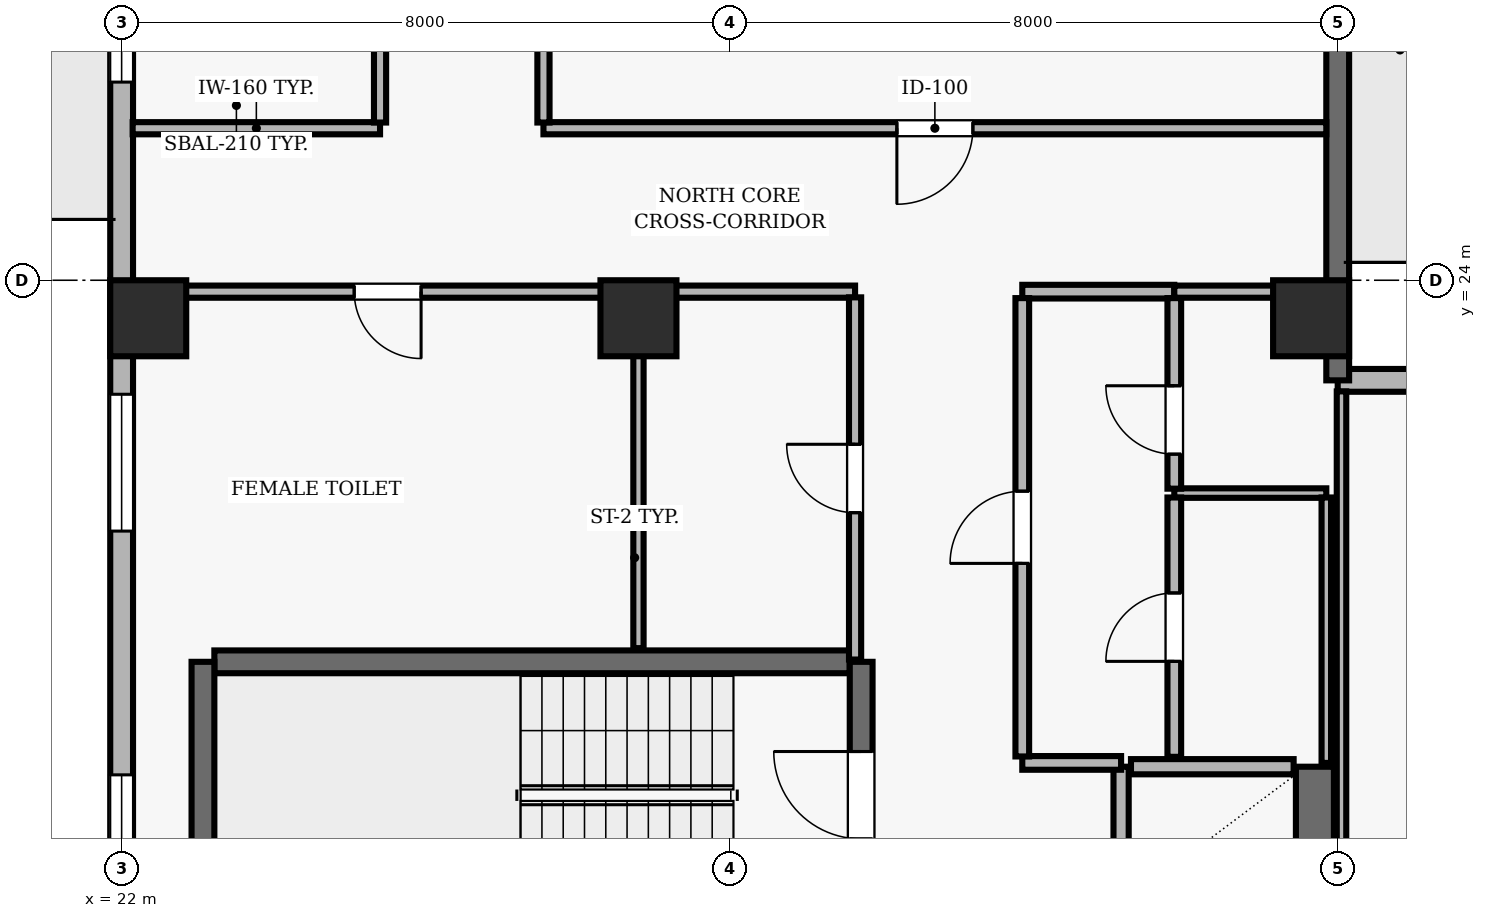
"""IFC4 building model, lengths in metres.
Left out: names, types, materials, properties, quantities, classifications, styles, units other than length and angle.
Written with IfcOpenShell. Run it as: python <this file> out.ifc"""

import sys

from ifc_helpers import new_model, si_unit, direction, frame, frame_2d, origin, origin_2d, place, context, subcontext, project, spatial, rectangle, extrude, element, fill, save


model = new_model("IFC4")
c1 = context("Model", 3, precision=1e-05, world=origin(), true_north=direction((0.0, 1.0)))
c2 = subcontext(c1, "Body", "Model", "MODEL_VIEW")
j1 = project(units=[si_unit("LENGTHUNIT", "METRE"), si_unit("PLANEANGLEUNIT", "RADIAN")], contexts=[c1])
p1 = place(None, origin())
s1 = spatial("IfcSite", under=j1, at=p1, CompositionType="ELEMENT")
p2 = place(p1, origin())
s2 = spatial("IfcBuilding", under=s1, at=p2, CompositionType="ELEMENT")
p3 = place(p2, frame((0.0, 0.0, 207.0)))
s3 = spatial("IfcBuildingStorey", under=s2, at=p3, CompositionType="ELEMENT", Elevation=207.0)
for number, where, z_axis, x_axis in (
    (1, (22.35, 23.5, 0.0), (0.0, 0.0, 1.0), (1.0, 0.0, 0.0)),
    (2, (28.8, 23.5, 0.0), (0.0, 0.0, 1.0), (1.0, 0.0, 0.0)),
    (3, (37.65, 23.5, 0.0), (0.0, 0.0, 1.0), (1.0, 0.0, 0.0)),
):
    element("IfcColumn", number, at=place(p3, frame(where, z_axis=z_axis, x_axis=x_axis)), inside=s3, PredefinedType="COLUMN", context=c2, shape_type="SweptSolid", body=[
        extrude(rectangle(XDim=1.0, YDim=1.0, at=origin_2d()), origin(), (0.0, 0.0, 1.0), 3.9),
    ])
p4 = place(p3, frame((44.45, 22.683, 0.0), z_axis=(0.0, 0.0, 1.0), x_axis=(-1.0, 0.0, 0.0)))
e4 = element("IfcWall", 4, at=p4, inside=s3, PredefinedType="SOLIDWALL", context=c2, shape_type="SweptSolid", body=[
    extrude(rectangle(XDim=6.45, YDim=0.3, at=frame_2d((3.225, 0.0))), origin(), (0.0, 0.0, 1.0), 3.69),
])
p5 = place(p4, frame((2.325, 0.0, 0.9)))
e5 = element("IfcOpeningElement", 5, at=p5, cuts=e4, PredefinedType="OPENING", context=c2, shape_type="SweptSolid", body=[
    extrude(rectangle(XDim=1.8, YDim=2.2, at=frame_2d((0.9, 1.1))), frame((0.0, 0.16, 0.0), z_axis=(0.0, -1.0, 0.0), x_axis=(1.0, 0.0, 0.0)), (0.0, 0.0, 1.0), 0.32),
])
p6 = place(p3, frame((38.0, 22.683, 0.0), z_axis=(0.0, 0.0, 1.0), x_axis=(0.0, 1.0, 0.0)))
e6 = element("IfcWall", 6, at=p6, inside=s3, PredefinedType="SOLIDWALL", context=c2, shape_type="SweptSolid", body=[
    extrude(rectangle(XDim=18.017, YDim=0.3, at=frame_2d((9.008, 0.0))), origin(), (0.0, 0.0, 1.0), 3.69),
])
p7 = place(p6, frame((8.934, 0.0, 0.0)))
e7 = element("IfcOpeningElement", 7, at=p7, cuts=e6, PredefinedType="OPENING", context=c2, shape_type="SweptSolid", body=[
    extrude(rectangle(XDim=1.0, YDim=2.2, at=frame_2d((0.5, 1.1))), frame((0.0, 0.16, 0.0), z_axis=(0.0, -1.0, 0.0), x_axis=(1.0, 0.0, 0.0)), (0.0, 0.0, 1.0), 0.32),
])
p8 = place(p6, frame((13.814, 0.0, 0.9)))
e8 = element("IfcOpeningElement", 8, at=p8, cuts=e6, PredefinedType="OPENING", context=c2, shape_type="SweptSolid", body=[
    extrude(rectangle(XDim=2.4, YDim=2.2, at=frame_2d((1.2, 1.1))), frame((0.0, 0.16, 0.0), z_axis=(0.0, -1.0, 0.0), x_axis=(1.0, 0.0, 0.0)), (0.0, 0.0, 1.0), 0.32),
])
p9 = place(p3, frame((22.0, 40.7, 0.0), z_axis=(0.0, 0.0, 1.0), x_axis=(0.0, -1.0, 0.0)))
e9 = element("IfcWall", 9, at=p9, inside=s3, PredefinedType="SOLIDWALL", context=c2, shape_type="SweptSolid", body=[
    extrude(rectangle(XDim=38.2, YDim=0.3, at=frame_2d((19.1, 0.0))), origin(), (0.0, 0.0, 1.0), 3.69),
])
p10 = place(p9, frame((7.8, 0.0, 0.0)))
e10 = element("IfcOpeningElement", 10, at=p10, cuts=e9, PredefinedType="OPENING", context=c2, shape_type="SweptSolid", body=[
    extrude(rectangle(XDim=1.0, YDim=2.2, at=frame_2d((0.5, 1.1))), frame((0.0, 0.16, 0.0), z_axis=(0.0, -1.0, 0.0), x_axis=(1.0, 0.0, 0.0)), (0.0, 0.0, 1.0), 0.32),
])
p11 = place(p9, frame((1.829, 0.0, 0.9)))
e11 = element("IfcOpeningElement", 11, at=p11, cuts=e9, PredefinedType="OPENING", context=c2, shape_type="SweptSolid", body=[
    extrude(rectangle(XDim=1.8, YDim=1.6, at=frame_2d((0.9, 0.8))), frame((0.0, 0.16, 0.0), z_axis=(0.0, -1.0, 0.0), x_axis=(1.0, 0.0, 0.0)), (0.0, 0.0, 1.0), 0.32),
])
p12 = place(p9, frame((12.293, 0.0, 0.9)))
e12 = element("IfcOpeningElement", 12, at=p12, cuts=e9, PredefinedType="OPENING", context=c2, shape_type="SweptSolid", body=[
    extrude(rectangle(XDim=1.8, YDim=1.6, at=frame_2d((0.9, 0.8))), frame((0.0, 0.16, 0.0), z_axis=(0.0, -1.0, 0.0), x_axis=(1.0, 0.0, 0.0)), (0.0, 0.0, 1.0), 0.32),
])
p13 = place(p9, frame((18.2, 0.0, 0.9)))
e13 = element("IfcOpeningElement", 13, at=p13, cuts=e9, PredefinedType="OPENING", context=c2, shape_type="SweptSolid", body=[
    extrude(rectangle(XDim=1.8, YDim=1.6, at=frame_2d((0.9, 0.8))), frame((0.0, 0.16, 0.0), z_axis=(0.0, -1.0, 0.0), x_axis=(1.0, 0.0, 0.0)), (0.0, 0.0, 1.0), 0.32),
])
p14 = place(p9, frame((23.207, 0.0, 0.9)))
e14 = element("IfcOpeningElement", 14, at=p14, cuts=e9, PredefinedType="OPENING", context=c2, shape_type="SweptSolid", body=[
    extrude(rectangle(XDim=1.8, YDim=1.6, at=frame_2d((0.9, 0.8))), frame((0.0, 0.16, 0.0), z_axis=(0.0, -1.0, 0.0), x_axis=(1.0, 0.0, 0.0)), (0.0, 0.0, 1.0), 0.32),
])
p15 = place(p9, frame((29.114, 0.0, 0.9)))
e15 = element("IfcOpeningElement", 15, at=p15, cuts=e9, PredefinedType="OPENING", context=c2, shape_type="SweptSolid", body=[
    extrude(rectangle(XDim=1.8, YDim=1.6, at=frame_2d((0.9, 0.8))), frame((0.0, 0.16, 0.0), z_axis=(0.0, -1.0, 0.0), x_axis=(1.0, 0.0, 0.0)), (0.0, 0.0, 1.0), 0.32),
])
p16 = place(p3, frame((31.58, 18.98, 0.0), z_axis=(0.0, 0.0, 1.0), x_axis=(-1.0, 0.0, 0.0)))
e16 = element("IfcWall", 16, at=p16, inside=s3, PredefinedType="SHEAR", context=c2, shape_type="SweptSolid", body=[
    extrude(rectangle(XDim=8.36, YDim=0.3, at=frame_2d((4.18, 0.0))), origin(), (0.0, 0.0, 1.0), 3.69),
])
p17 = place(p3, frame((23.07, 18.98, 0.0), z_axis=(0.0, 0.0, 1.0), x_axis=(0.0, -1.0, 0.0)))
e17 = element("IfcWall", 17, at=p17, inside=s3, PredefinedType="SHEAR", context=c2, shape_type="SweptSolid", body=[
    extrude(rectangle(XDim=3.51, YDim=0.3, at=frame_2d((1.755, 0.0))), origin(), (0.0, 0.0, 1.0), 3.69),
])
p18 = place(p3, frame((31.73, 15.47, 0.0), z_axis=(0.0, 0.0, 1.0), x_axis=(0.0, 1.0, 0.0)))
e18 = element("IfcWall", 18, at=p18, inside=s3, PredefinedType="SHEAR", context=c2, shape_type="SweptSolid", body=[
    extrude(rectangle(XDim=3.51, YDim=0.3, at=frame_2d((1.755, 0.0))), origin(), (0.0, 0.0, 1.0), 3.69),
])
p19 = place(p18, frame((1.18, 0.0, 0.0)))
e19 = element("IfcOpeningElement", 19, at=p19, cuts=e18, PredefinedType="OPENING", context=c2, shape_type="SweptSolid", body=[
    extrude(rectangle(XDim=1.15, YDim=2.15, at=frame_2d((0.575, 1.075))), frame((0.0, 0.16, 0.0), z_axis=(0.0, -1.0, 0.0), x_axis=(1.0, 0.0, 0.0)), (0.0, 0.0, 1.0), 0.32),
])
p20 = place(p3, frame((35.15, 17.6, 0.0), z_axis=(0.0, 0.0, 1.0), x_axis=(0.0, -1.0, 0.0)))
e20 = element("IfcWall", 20, at=p20, inside=s3, PredefinedType="SOLIDWALL", context=c2, shape_type="SweptSolid", body=[
    extrude(rectangle(XDim=1.85, YDim=0.2, at=frame_2d((0.925, 0.0))), origin(), (0.0, 0.0, 1.0), 3.69),
])
p21 = place(p3, frame((37.7, 15.75, 0.0), z_axis=(0.0, 0.0, 1.0), x_axis=(0.0, 1.0, 0.0)))
e21 = element("IfcWall", 21, at=p21, inside=s3, PredefinedType="SHEAR", context=c2, shape_type="SweptSolid", body=[
    extrude(rectangle(XDim=1.85, YDim=0.5, at=frame_2d((0.925, 0.0))), origin(), (0.0, 0.0, 1.0), 3.69),
])
p22 = place(p3, frame((37.42, 17.6, 0.0), z_axis=(0.0, 0.0, 1.0), x_axis=(-1.0, 0.0, 0.0)))
e22 = element("IfcWall", 22, at=p22, inside=s3, PredefinedType="SOLIDWALL", context=c2, shape_type="SweptSolid", body=[
    extrude(rectangle(XDim=2.14, YDim=0.2, at=frame_2d((1.07, 0.0))), origin(), (0.0, 0.0, 1.0), 3.69),
])
p23 = place(p3, frame((25.4, 26.0, 0.0), z_axis=(0.0, 0.0, 1.0), x_axis=(-1.0, 0.0, 0.0)))
e23 = element("IfcWall", 23, at=p23, inside=s3, PredefinedType="PARTITIONING", context=c2, shape_type="SweptSolid", body=[
    extrude(rectangle(XDim=3.255, YDim=0.16, at=frame_2d((1.627, 0.0))), origin(), (0.0, 0.0, 1.0), 3.69),
])
p24 = place(p3, frame((28.8, 23.85, 0.0), z_axis=(0.0, 0.0, 1.0), x_axis=(-1.0, 0.0, 0.0)))
e24 = element("IfcWall", 24, at=p24, inside=s3, PredefinedType="PARTITIONING", context=c2, shape_type="SweptSolid", body=[
    extrude(rectangle(XDim=6.6, YDim=0.16, at=frame_2d((3.3, 0.0))), origin(), (0.0, 0.0, 1.0), 3.139),
])
p25 = place(p24, frame((2.86, 0.0, 0.0)))
e25 = element("IfcOpeningElement", 25, at=p25, cuts=e24, PredefinedType="OPENING", context=c2, shape_type="SweptSolid", body=[
    extrude(rectangle(XDim=0.88, YDim=2.1, at=frame_2d((0.44, 1.05))), frame((0.0, 0.09, 0.0), z_axis=(0.0, -1.0, 0.0), x_axis=(1.0, 0.0, 0.0)), (0.0, 0.0, 1.0), 0.18),
])
p26 = place(p3, frame((31.65, 23.85, 0.0), z_axis=(0.0, 0.0, 1.0), x_axis=(-1.0, 0.0, 0.0)))
e26 = element("IfcWall", 26, at=p26, inside=s3, PredefinedType="PARTITIONING", context=c2, shape_type="SweptSolid", body=[
    extrude(rectangle(XDim=2.85, YDim=0.16, at=frame_2d((1.425, 0.0))), origin(), (0.0, 0.0, 1.0), 3.139),
])
p27 = place(p3, frame((33.85, 17.65, 0.0), z_axis=(0.0, 0.0, 1.0), x_axis=(1.0, 0.0, 0.0)))
e27 = element("IfcWall", 27, at=p27, inside=s3, PredefinedType="PARTITIONING", context=c2, shape_type="SweptSolid", body=[
    extrude(rectangle(XDim=1.3, YDim=0.18, at=frame_2d((0.65, 0.0))), origin(), (0.0, 0.0, 1.0), 3.69),
])
p28 = place(p3, frame((35.85, 21.2, 0.0), z_axis=(0.0, 0.0, 1.0), x_axis=(1.0, 0.0, 0.0)))
e28 = element("IfcWall", 28, at=p28, inside=s3, PredefinedType="PARTITIONING", context=c2, shape_type="SweptSolid", body=[
    extrude(rectangle(XDim=2.0, YDim=0.125, at=frame_2d((1.0, 0.0))), origin(), (0.0, 0.0, 1.0), 3.139),
])
p29 = place(p3, frame((35.85, 23.85, 0.0), z_axis=(0.0, 0.0, 1.0), x_axis=(-1.0, 0.0, 0.0)))
e29 = element("IfcWall", 29, at=p29, inside=s3, PredefinedType="PARTITIONING", context=c2, shape_type="SweptSolid", body=[
    extrude(rectangle(XDim=2.0, YDim=0.18, at=frame_2d((1.0, 0.0))), origin(), (0.0, 0.0, 1.0), 3.139),
])
p30 = place(p3, frame((37.85, 23.85, 0.0), z_axis=(0.0, 0.0, 1.0), x_axis=(-1.0, 0.0, 0.0)))
e30 = element("IfcWall", 30, at=p30, inside=s3, PredefinedType="PARTITIONING", context=c2, shape_type="SweptSolid", body=[
    extrude(rectangle(XDim=2.0, YDim=0.16, at=frame_2d((1.0, 0.0))), origin(), (0.0, 0.0, 1.0), 3.139),
])
p31 = place(p3, frame((37.85, 26.0, 0.0), z_axis=(0.0, 0.0, 1.0), x_axis=(-1.0, 0.0, 0.0)))
e31 = element("IfcWall", 31, at=p31, inside=s3, PredefinedType="PARTITIONING", context=c2, shape_type="SweptSolid", body=[
    extrude(rectangle(XDim=10.3, YDim=0.16, at=frame_2d((5.15, 0.0))), origin(), (0.0, 0.0, 1.0), 3.69),
])
p32 = place(p31, frame((4.65, 0.0, 0.0)))
e32 = element("IfcOpeningElement", 32, at=p32, cuts=e31, PredefinedType="OPENING", context=c2, shape_type="SweptSolid", body=[
    extrude(rectangle(XDim=1.0, YDim=2.1, at=frame_2d((0.5, 1.05))), frame((0.0, 0.09, 0.0), z_axis=(0.0, -1.0, 0.0), x_axis=(1.0, 0.0, 0.0)), (0.0, 0.0, 1.0), 0.18),
])
p33 = place(p3, frame((25.4, 35.715, 0.0), z_axis=(0.0, 0.0, 1.0), x_axis=(0.0, -1.0, 0.0)))
e33 = element("IfcWall", 33, at=p33, inside=s3, PredefinedType="PARTITIONING", context=c2, shape_type="SweptSolid", body=[
    extrude(rectangle(XDim=9.64, YDim=0.16, at=frame_2d((4.82, 0.0))), origin(), (0.0, 0.0, 1.0), 3.69),
])
p34 = place(p33, frame((4.37, 0.0, 0.0)))
e34 = element("IfcOpeningElement", 34, at=p34, cuts=e33, PredefinedType="OPENING", context=c2, shape_type="SweptSolid", body=[
    extrude(rectangle(XDim=0.9, YDim=2.1, at=frame_2d((0.45, 1.05))), frame((0.0, 0.09, 0.0), z_axis=(0.0, -1.0, 0.0), x_axis=(1.0, 0.0, 0.0)), (0.0, 0.0, 1.0), 0.18),
])
p35 = place(p3, frame((27.55, 26.075, 0.0), z_axis=(0.0, 0.0, 1.0), x_axis=(0.0, 1.0, 0.0)))
e35 = element("IfcWall", 35, at=p35, inside=s3, PredefinedType="PARTITIONING", context=c2, shape_type="SweptSolid", body=[
    extrude(rectangle(XDim=9.657, YDim=0.16, at=frame_2d((4.829, 0.0))), origin(), (0.0, 0.0, 1.0), 3.69),
])
p36 = place(p3, frame((28.8, 23.775, 0.0), z_axis=(0.0, 0.0, 1.0), x_axis=(0.0, -1.0, 0.0)))
e36 = element("IfcWall", 36, at=p36, inside=s3, PredefinedType="PARTITIONING", context=c2, shape_type="SweptSolid", body=[
    extrude(rectangle(XDim=4.615, YDim=0.135, at=frame_2d((2.308, 0.0))), origin(), (0.0, 0.0, 1.0), 3.69),
])
p37 = place(p3, frame((31.65, 19.01, 0.0), z_axis=(0.0, 0.0, 1.0), x_axis=(0.0, 1.0, 0.0)))
e37 = element("IfcWall", 37, at=p37, inside=s3, PredefinedType="PARTITIONING", context=c2, shape_type="SweptSolid", body=[
    extrude(rectangle(XDim=4.765, YDim=0.16, at=frame_2d((2.382, 0.0))), origin(), (0.0, 0.0, 1.0), 3.69),
])
p38 = place(p37, frame((1.932, 0.0, 0.0)))
e38 = element("IfcOpeningElement", 38, at=p38, cuts=e37, PredefinedType="OPENING", context=c2, shape_type="SweptSolid", body=[
    extrude(rectangle(XDim=0.9, YDim=2.1, at=frame_2d((0.45, 1.05))), frame((0.0, 0.09, 0.0), z_axis=(0.0, -1.0, 0.0), x_axis=(1.0, 0.0, 0.0)), (0.0, 0.0, 1.0), 0.18),
])
p39 = place(p3, frame((33.85, 17.735, 0.0), z_axis=(0.0, 0.0, 1.0), x_axis=(0.0, 1.0, 0.0)))
e39 = element("IfcWall", 39, at=p39, inside=s3, PredefinedType="PARTITIONING", context=c2, shape_type="SweptSolid", body=[
    extrude(rectangle(XDim=6.03, YDim=0.18, at=frame_2d((3.015, 0.0))), origin(), (0.0, 0.0, 1.0), 3.69),
])
p40 = place(p39, frame((2.54, 0.0, 0.0)))
e40 = element("IfcOpeningElement", 40, at=p40, cuts=e39, PredefinedType="OPENING", context=c2, shape_type="SweptSolid", body=[
    extrude(rectangle(XDim=0.95, YDim=2.1, at=frame_2d((0.475, 1.05))), frame((0.0, 0.1, 0.0), z_axis=(0.0, -1.0, 0.0), x_axis=(1.0, 0.0, 0.0)), (0.0, 0.0, 1.0), 0.2),
])
p41 = place(p3, frame((35.85, 17.73, 0.0), z_axis=(0.0, 0.0, 1.0), x_axis=(0.0, 1.0, 0.0)))
e41 = element("IfcWall", 41, at=p41, inside=s3, PredefinedType="PARTITIONING", context=c2, shape_type="SweptSolid", body=[
    extrude(rectangle(XDim=3.412, YDim=0.18, at=frame_2d((1.706, 0.0))), origin(), (0.0, 0.0, 1.0), 3.69),
])
p42 = place(p41, frame((1.256, 0.0, 0.0)))
e42 = element("IfcOpeningElement", 42, at=p42, cuts=e41, PredefinedType="OPENING", context=c2, shape_type="SweptSolid", body=[
    extrude(rectangle(XDim=0.9, YDim=2.1, at=frame_2d((0.45, 1.05))), frame((0.0, 0.1, 0.0), z_axis=(0.0, -1.0, 0.0), x_axis=(1.0, 0.0, 0.0)), (0.0, 0.0, 1.0), 0.2),
])
p43 = place(p3, frame((35.85, 21.258, 0.0), z_axis=(0.0, 0.0, 1.0), x_axis=(0.0, 1.0, 0.0)))
e43 = element("IfcWall", 43, at=p43, inside=s3, PredefinedType="PARTITIONING", context=c2, shape_type="SweptSolid", body=[
    extrude(rectangle(XDim=2.507, YDim=0.18, at=frame_2d((1.253, 0.0))), origin(), (0.0, 0.0, 1.0), 3.69),
])
p44 = place(p43, frame((0.454, 0.0, 0.0)))
e44 = element("IfcOpeningElement", 44, at=p44, cuts=e43, PredefinedType="OPENING", context=c2, shape_type="SweptSolid", body=[
    extrude(rectangle(XDim=0.9, YDim=2.1, at=frame_2d((0.45, 1.05))), frame((0.0, 0.1, 0.0), z_axis=(0.0, -1.0, 0.0), x_axis=(1.0, 0.0, 0.0)), (0.0, 0.0, 1.0), 0.2),
])
p45 = place(p3, frame((37.85, 17.65, 0.0), z_axis=(0.0, 0.0, 1.0), x_axis=(0.0, 1.0, 0.0)))
e45 = element("IfcWall", 45, at=p45, inside=s3, PredefinedType="PARTITIONING", context=c2, shape_type="SweptSolid", body=[
    extrude(rectangle(XDim=3.492, YDim=0.125, at=frame_2d((1.746, 0.0))), origin(), (0.0, 0.0, 1.0), 3.139),
])
p46 = place(p3, frame((38.05, 22.538, 0.0), z_axis=(0.0, 0.0, 1.0), x_axis=(0.0, -1.0, 0.0)))
e46 = element("IfcWall", 46, at=p46, inside=s3, PredefinedType="PARTITIONING", context=c2, shape_type="SweptSolid", body=[
    extrude(rectangle(XDim=6.463, YDim=0.125, at=frame_2d((3.231, 0.0))), origin(), (0.0, 0.0, 1.0), 3.139),
])
p47 = place(p12, origin())
e47 = element("IfcWindow", 47, at=p47, inside=s3, PartitioningType="SINGLE_PANEL", PredefinedType="WINDOW", context=c2, shape_type="SweptSolid", body=[
    extrude(rectangle(XDim=1.8, YDim=1.6, at=frame_2d((0.9, 0.8))), frame((0.0, 0.03, 0.0), z_axis=(0.0, -1.0, 0.0), x_axis=(1.0, 0.0, 0.0)), (0.0, 0.0, 1.0), 0.06),
])
fill(e12, e47)
p48 = place(p13, origin())
e48 = element("IfcWindow", 48, at=p48, inside=s3, PartitioningType="SINGLE_PANEL", PredefinedType="WINDOW", context=c2, shape_type="SweptSolid", body=[
    extrude(rectangle(XDim=1.8, YDim=1.6, at=frame_2d((0.9, 0.8))), frame((0.0, 0.03, 0.0), z_axis=(0.0, -1.0, 0.0), x_axis=(1.0, 0.0, 0.0)), (0.0, 0.0, 1.0), 0.06),
])
fill(e13, e48)
p49 = place(p14, origin())
e49 = element("IfcWindow", 49, at=p49, inside=s3, PartitioningType="SINGLE_PANEL", PredefinedType="WINDOW", context=c2, shape_type="SweptSolid", body=[
    extrude(rectangle(XDim=1.8, YDim=1.6, at=frame_2d((0.9, 0.8))), frame((0.0, 0.03, 0.0), z_axis=(0.0, -1.0, 0.0), x_axis=(1.0, 0.0, 0.0)), (0.0, 0.0, 1.0), 0.06),
])
fill(e14, e49)
p50 = place(p19, origin())
e50 = element("IfcDoor", 50, at=p50, inside=s3, OperationType="SINGLE_SWING_RIGHT", PredefinedType="DOOR", context=c2, shape_type="SweptSolid", body=[
    extrude(rectangle(XDim=1.15, YDim=2.15, at=frame_2d((0.575, 1.075))), frame((0.0, 0.025, 0.0), z_axis=(0.0, -1.0, 0.0), x_axis=(1.0, 0.0, 0.0)), (0.0, 0.0, 1.0), 0.05),
])
fill(e19, e50)
p51 = place(p40, origin())
e51 = element("IfcDoor", 51, at=p51, inside=s3, OperationType="SINGLE_SWING_LEFT", PredefinedType="DOOR", context=c2, shape_type="SweptSolid", body=[
    extrude(rectangle(XDim=0.95, YDim=2.1, at=frame_2d((0.475, 1.05))), frame((0.0, 0.025, 0.0), z_axis=(0.0, -1.0, 0.0), x_axis=(1.0, 0.0, 0.0)), (0.0, 0.0, 1.0), 0.05),
])
fill(e40, e51)
p52 = place(p44, origin())
e52 = element("IfcDoor", 52, at=p52, inside=s3, OperationType="SINGLE_SWING_RIGHT", PredefinedType="DOOR", context=c2, shape_type="SweptSolid", body=[
    extrude(rectangle(XDim=0.9, YDim=2.1, at=frame_2d((0.45, 1.05))), frame((0.0, 0.025, 0.0), z_axis=(0.0, -1.0, 0.0), x_axis=(1.0, 0.0, 0.0)), (0.0, 0.0, 1.0), 0.05),
])
fill(e44, e52)
p53 = place(p42, origin())
e53 = element("IfcDoor", 53, at=p53, inside=s3, OperationType="SINGLE_SWING_LEFT", PredefinedType="DOOR", context=c2, shape_type="SweptSolid", body=[
    extrude(rectangle(XDim=0.9, YDim=2.1, at=frame_2d((0.45, 1.05))), frame((0.0, 0.025, 0.0), z_axis=(0.0, -1.0, 0.0), x_axis=(1.0, 0.0, 0.0)), (0.0, 0.0, 1.0), 0.05),
])
fill(e42, e53)
p54 = place(p38, origin())
e54 = element("IfcDoor", 54, at=p54, inside=s3, OperationType="SINGLE_SWING_RIGHT", PredefinedType="DOOR", context=c2, shape_type="SweptSolid", body=[
    extrude(rectangle(XDim=0.9, YDim=2.1, at=frame_2d((0.45, 1.05))), frame((0.0, 0.025, 0.0), z_axis=(0.0, -1.0, 0.0), x_axis=(1.0, 0.0, 0.0)), (0.0, 0.0, 1.0), 0.05),
])
fill(e38, e54)
p55 = place(p25, origin())
e55 = element("IfcDoor", 55, at=p55, inside=s3, OperationType="SINGLE_SWING_LEFT", PredefinedType="DOOR", context=c2, shape_type="SweptSolid", body=[
    extrude(rectangle(XDim=0.88, YDim=2.1, at=frame_2d((0.44, 1.05))), frame((0.0, 0.025, 0.0), z_axis=(0.0, -1.0, 0.0), x_axis=(1.0, 0.0, 0.0)), (0.0, 0.0, 1.0), 0.05),
])
fill(e25, e55)
p56 = place(p32, origin())
e56 = element("IfcDoor", 56, at=p56, inside=s3, OperationType="SINGLE_SWING_RIGHT", PredefinedType="DOOR", context=c2, shape_type="SweptSolid", body=[
    extrude(rectangle(XDim=1.0, YDim=2.1, at=frame_2d((0.5, 1.05))), frame((0.0, 0.025, 0.0), z_axis=(0.0, -1.0, 0.0), x_axis=(1.0, 0.0, 0.0)), (0.0, 0.0, 1.0), 0.05),
])
fill(e32, e56)
save(model, sys.argv[1])
